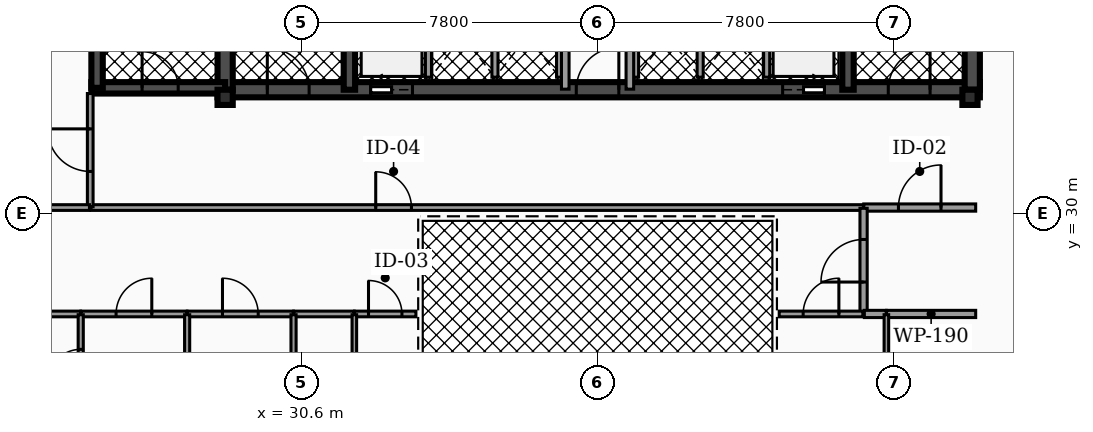
"""IFC4 building model, lengths in metres.
Left out: names, types, materials, properties, quantities, classifications, styles, units other than length and angle.
Written with IfcOpenShell. Run it as: python <this file> out.ifc"""

import sys

from ifc_helpers import new_model, si_unit, direction, frame, frame_2d, origin, origin_2d, place, context, subcontext, project, spatial, rectangle, hollow_rectangle, extrude, element, fill, save


model = new_model("IFC4")
c1 = context("Model", 3, precision=1e-05, world=origin(), true_north=direction((0.0, 1.0)))
c2 = subcontext(c1, "Body", "Model", "MODEL_VIEW")
j1 = project(units=[si_unit("LENGTHUNIT", "METRE"), si_unit("PLANEANGLEUNIT", "RADIAN")], contexts=[c1])
p1 = place(None, origin())
s1 = spatial("IfcSite", under=j1, at=p1, CompositionType="ELEMENT")
p2 = place(p1, origin())
s2 = spatial("IfcBuilding", under=s1, at=p2, CompositionType="ELEMENT")
p3 = place(p2, frame((0.0, 0.0, 9.52)))
s3 = spatial("IfcBuildingStorey", under=s2, at=p3, CompositionType="ELEMENT", Elevation=9.52)
p4 = place(p3, frame((28.4, 33.25, 0.0), z_axis=(0.0, 0.0, 1.0), x_axis=(1.0, 0.0, 0.0)))
e1 = element("IfcWall", 1, at=p4, inside=s3, PredefinedType="SHEAR", context=c2, shape_type="SweptSolid", body=[
    extrude(rectangle(XDim=20.06, YDim=0.4, at=frame_2d((10.03, 0.0))), origin(), (0.0, 0.0, 1.0), 4.14),
])
p5 = place(p4, frame((4.03, 0.0, 0.0)))
e2 = element("IfcOpeningElement", 2, at=p5, cuts=e1, PredefinedType="OPENING", context=c2, shape_type="SweptSolid", body=[
    extrude(rectangle(XDim=1.1, YDim=2.15, at=frame_2d((0.55, 1.075))), frame((0.0, 0.21, 0.0), z_axis=(0.0, -1.0, 0.0), x_axis=(1.0, 0.0, 0.0)), (0.0, 0.0, 1.0), 0.42),
])
p6 = place(p4, frame((14.87, 0.0, 0.0)))
e3 = element("IfcOpeningElement", 3, at=p6, cuts=e1, PredefinedType="OPENING", context=c2, shape_type="SweptSolid", body=[
    extrude(rectangle(XDim=1.1, YDim=2.15, at=frame_2d((0.55, 1.075))), frame((0.0, 0.21, 0.0), z_axis=(0.0, -1.0, 0.0), x_axis=(1.0, 0.0, 0.0)), (0.0, 0.0, 1.0), 0.42),
])
p7 = place(p4, frame((1.31, 0.0, 0.0)))
e4 = element("IfcOpeningElement", 4, at=p7, cuts=e1, PredefinedType="OPENING", context=c2, shape_type="SweptSolid", body=[
    extrude(rectangle(XDim=1.1, YDim=2.2, at=frame_2d((0.55, 1.1))), frame((0.0, 0.21, 0.0), z_axis=(0.0, -1.0, 0.0), x_axis=(1.0, 0.0, 0.0)), (0.0, 0.0, 1.0), 0.42),
])
p8 = place(p4, frame((9.44, 0.0, 0.0)))
e5 = element("IfcOpeningElement", 5, at=p8, cuts=e1, PredefinedType="OPENING", context=c2, shape_type="SweptSolid", body=[
    extrude(rectangle(XDim=1.12, YDim=2.05, at=frame_2d((0.56, 1.025))), frame((0.0, 0.21, 0.0), z_axis=(0.0, -1.0, 0.0), x_axis=(1.0, 0.0, 0.0)), (0.0, 0.0, 1.0), 0.42),
])
p9 = place(p4, frame((17.65, 0.0, 0.0)))
e6 = element("IfcOpeningElement", 6, at=p9, cuts=e1, PredefinedType="OPENING", context=c2, shape_type="SweptSolid", body=[
    extrude(rectangle(XDim=1.1, YDim=2.2, at=frame_2d((0.55, 1.1))), frame((0.0, 0.21, 0.0), z_axis=(0.0, -1.0, 0.0), x_axis=(1.0, 0.0, 0.0)), (0.0, 0.0, 1.0), 0.42),
])
p10 = place(p3, frame((28.6, 33.25, 0.0), z_axis=(0.0, 0.0, 1.0), x_axis=(0.0, 1.0, 0.0)))
e7 = element("IfcWall", 7, at=p10, inside=s3, PredefinedType="SHEAR", context=c2, shape_type="SweptSolid", body=[
    extrude(rectangle(XDim=10.2, YDim=0.4, at=frame_2d((5.1, 0.0))), origin(), (0.0, 0.0, 1.0), 4.14),
])
for number, where, z_axis, x_axis in (
    (8, (31.87, 33.25, 0.0), (0.0, 0.0, 1.0), (0.0, 1.0, 0.0)),
    (9, (44.99, 33.25, 0.0), (0.0, 0.0, 1.0), (0.0, 1.0, 0.0)),
):
    element("IfcWall", number, at=place(p3, frame(where, z_axis=z_axis, x_axis=x_axis)), inside=s3, PredefinedType="SHEAR", context=c2, shape_type="SweptSolid", body=[
        extrude(rectangle(XDim=10.2, YDim=0.3, at=frame_2d((5.1, 0.0))), origin(), (0.0, 0.0, 1.0), 4.14),
    ])
p11 = place(p3, frame((48.26, 33.25, 0.0), z_axis=(0.0, 0.0, 1.0), x_axis=(0.0, 1.0, 0.0)))
e10 = element("IfcWall", 10, at=p11, inside=s3, PredefinedType="SHEAR", context=c2, shape_type="SweptSolid", body=[
    extrude(rectangle(XDim=10.2, YDim=0.4, at=frame_2d((5.1, 0.0))), origin(), (0.0, 0.0, 1.0), 4.14),
])
p12 = place(p3, frame((25.08, 33.3, 0.0), z_axis=(0.0, 0.0, 1.0), x_axis=(1.0, 0.0, 0.0)))
e11 = element("IfcWall", 11, at=p12, inside=s3, PredefinedType="SHEAR", context=c2, shape_type="SweptSolid", body=[
    extrude(rectangle(XDim=3.52, YDim=0.3, at=frame_2d((1.76, 0.0))), origin(), (0.0, 0.0, 1.0), 4.14),
])
p13 = place(p12, frame((1.335, 0.0, 0.0)))
e12 = element("IfcOpeningElement", 12, at=p13, cuts=e11, PredefinedType="OPENING", context=c2, shape_type="SweptSolid", body=[
    extrude(rectangle(XDim=0.95, YDim=2.2, at=frame_2d((0.475, 1.1))), frame((0.0, 0.16, 0.0), z_axis=(0.0, -1.0, 0.0), x_axis=(1.0, 0.0, 0.0)), (0.0, 0.0, 1.0), 0.32),
])
p14 = place(p3, frame((25.23, 33.3, 0.0), z_axis=(0.0, 0.0, 1.0), x_axis=(0.0, 1.0, 0.0)))
e13 = element("IfcWall", 13, at=p14, inside=s3, PredefinedType="SHEAR", context=c2, shape_type="SweptSolid", body=[
    extrude(rectangle(XDim=7.6, YDim=0.3, at=frame_2d((3.8, 0.0))), origin(), (0.0, 0.0, 1.0), 4.14),
])
for number, where, z_axis, x_axis in (
    (14, (28.6, 33.05, 0.0), (0.0, 0.0, 1.0), (1.0, 0.0, 0.0)),
    (15, (48.2, 33.05, 0.0), (0.0, 0.0, 1.0), (1.0, 0.0, 0.0)),
):
    element("IfcColumn", number, at=place(p3, frame(where, z_axis=z_axis, x_axis=x_axis)), inside=s3, PredefinedType="PILASTER", context=c2, shape_type="SweptSolid", body=[
        extrude(hollow_rectangle(XDim=0.4, YDim=0.4, WallThickness=0.02, at=origin_2d()), origin(), (0.0, 0.0, 1.0), 4.14),
    ])
for number, where, z_axis, x_axis in (
    (16, (33.95, 33.58, 0.0), (0.0, 0.0, 1.0), (0.0, 1.0, 0.0)),
    (17, (42.85, 33.58, 0.0), (0.0, 0.0, 1.0), (0.0, 1.0, 0.0)),
):
    element("IfcWall", number, at=place(p3, frame(where, z_axis=z_axis, x_axis=x_axis)), inside=s3, PredefinedType="SOLIDWALL", context=c2, shape_type="SweptSolid", body=[
        extrude(rectangle(XDim=2.45, YDim=0.16, at=frame_2d((1.225, 0.0))), origin(), (0.0, 0.0, 1.0), 3.112),
    ])
for number, where, z_axis, x_axis in (
    (18, (35.7, 33.58, 0.0), (0.0, 0.0, 1.0), (0.0, 1.0, 0.0)),
    (19, (37.4, 33.58, 0.0), (0.0, 0.0, 1.0), (0.0, 1.0, 0.0)),
    (20, (39.4, 33.58, 0.0), (0.0, 0.0, 1.0), (0.0, 1.0, 0.0)),
    (21, (41.1, 33.58, 0.0), (0.0, 0.0, 1.0), (0.0, 1.0, 0.0)),
):
    element("IfcWall", number, at=place(p3, frame(where, z_axis=z_axis, x_axis=x_axis)), inside=s3, PredefinedType="SOLIDWALL", context=c2, shape_type="SweptSolid", body=[
        extrude(rectangle(XDim=2.25, YDim=0.16, at=frame_2d((1.125, 0.0))), origin(), (0.0, 0.0, 1.0), 3.112),
    ])
p15 = place(p3, frame((37.55, 33.265, 0.0), z_axis=(0.0, 0.0, 1.0), x_axis=(0.0, 1.0, 0.0)))
e22 = element("IfcWall", 22, at=p15, inside=s3, PredefinedType="PARTITIONING", context=c2, shape_type="SweptSolid", body=[
    extrude(rectangle(XDim=4.265, YDim=0.2, at=frame_2d((2.133, 0.0))), origin(), (0.0, 0.0, 1.0), 3.097),
])
p16 = place(p15, frame((3.093, 0.0, 0.0)))
e23 = element("IfcOpeningElement", 23, at=p16, cuts=e22, PredefinedType="OPENING", context=c2, shape_type="SweptSolid", body=[
    extrude(rectangle(XDim=0.88, YDim=2.05, at=frame_2d((0.44, 1.025))), frame((0.0, 0.11, 0.0), z_axis=(0.0, -1.0, 0.0), x_axis=(1.0, 0.0, 0.0)), (0.0, 0.0, 1.0), 0.22),
])
p17 = place(p3, frame((39.25, 33.265, 0.0), z_axis=(0.0, 0.0, 1.0), x_axis=(0.0, 1.0, 0.0)))
e24 = element("IfcWall", 24, at=p17, inside=s3, PredefinedType="PARTITIONING", context=c2, shape_type="SweptSolid", body=[
    extrude(rectangle(XDim=4.265, YDim=0.2, at=frame_2d((2.133, 0.0))), origin(), (0.0, 0.0, 1.0), 3.097),
])
p18 = place(p17, frame((3.093, 0.0, 0.0)))
e25 = element("IfcOpeningElement", 25, at=p18, cuts=e24, PredefinedType="OPENING", context=c2, shape_type="SweptSolid", body=[
    extrude(rectangle(XDim=0.88, YDim=2.05, at=frame_2d((0.44, 1.025))), frame((0.0, 0.11, 0.0), z_axis=(0.0, -1.0, 0.0), x_axis=(1.0, 0.0, 0.0)), (0.0, 0.0, 1.0), 0.22),
])
p19 = place(p3, frame((45.405, 30.15, 0.0), z_axis=(0.0, 0.0, 1.0), x_axis=(1.0, 0.0, 0.0)))
e26 = element("IfcWall", 26, at=p19, inside=s3, PredefinedType="PARTITIONING", context=c2, shape_type="SweptSolid", body=[
    extrude(rectangle(XDim=2.945, YDim=0.19, at=frame_2d((1.473, 0.0))), origin(), (0.0, 0.0, 1.0), 3.097),
])
p20 = place(p19, frame((0.913, 0.0, 0.0)))
e27 = element("IfcOpeningElement", 27, at=p20, cuts=e26, PredefinedType="OPENING", context=c2, shape_type="SweptSolid", body=[
    extrude(rectangle(XDim=1.12, YDim=2.05, at=frame_2d((0.56, 1.025))), frame((0.0, 0.105, 0.0), z_axis=(0.0, -1.0, 0.0), x_axis=(1.0, 0.0, 0.0)), (0.0, 0.0, 1.0), 0.21),
])
p21 = place(p3, frame((25.07, 30.15, 0.0), z_axis=(0.0, 0.0, 1.0), x_axis=(1.0, 0.0, 0.0)))
e28 = element("IfcWall", 28, at=p21, inside=s3, PredefinedType="PARTITIONING", context=c2, shape_type="SweptSolid", body=[
    extrude(rectangle(XDim=20.325, YDim=0.15, at=frame_2d((10.163, 0.0))), origin(), (0.0, 0.0, 1.0), 3.097),
])
p22 = place(p21, frame((7.492, 0.0, 0.0)))
e29 = element("IfcOpeningElement", 29, at=p22, cuts=e28, PredefinedType="OPENING", context=c2, shape_type="SweptSolid", body=[
    extrude(rectangle(XDim=0.94, YDim=2.05, at=frame_2d((0.47, 1.025))), frame((0.0, 0.085, 0.0), z_axis=(0.0, -1.0, 0.0), x_axis=(1.0, 0.0, 0.0)), (0.0, 0.0, 1.0), 0.17),
])
p23 = place(p3, frame((25.05, 30.17, 0.0), z_axis=(0.0, 0.0, 1.0), x_axis=(0.0, 1.0, 0.0)))
e30 = element("IfcWall", 30, at=p23, inside=s3, PredefinedType="PARTITIONING", context=c2, shape_type="SweptSolid", body=[
    extrude(rectangle(XDim=2.98, YDim=0.15, at=frame_2d((1.49, 0.0))), origin(), (0.0, 0.0, 1.0), 3.097),
])
p24 = place(p23, frame((0.93, 0.0, 0.0)))
e31 = element("IfcOpeningElement", 31, at=p24, cuts=e30, PredefinedType="OPENING", context=c2, shape_type="SweptSolid", body=[
    extrude(rectangle(XDim=1.12, YDim=2.05, at=frame_2d((0.56, 1.025))), frame((0.0, 0.085, 0.0), z_axis=(0.0, -1.0, 0.0), x_axis=(1.0, 0.0, 0.0)), (0.0, 0.0, 1.0), 0.17),
])
p25 = place(p3, frame((45.4, 27.37, 0.0), z_axis=(0.0, 0.0, 1.0), x_axis=(0.0, 1.0, 0.0)))
e32 = element("IfcWall", 32, at=p25, inside=s3, PredefinedType="PARTITIONING", context=c2, shape_type="SweptSolid", body=[
    extrude(rectangle(XDim=2.76, YDim=0.19, at=frame_2d((1.38, 0.0))), origin(), (0.0, 0.0, 1.0), 3.097),
])
p26 = place(p25, frame((0.82, 0.0, 0.0)))
e33 = element("IfcOpeningElement", 33, at=p26, cuts=e32, PredefinedType="OPENING", context=c2, shape_type="SweptSolid", body=[
    extrude(rectangle(XDim=1.12, YDim=2.05, at=frame_2d((0.56, 1.025))), frame((0.0, 0.105, 0.0), z_axis=(0.0, -1.0, 0.0), x_axis=(1.0, 0.0, 0.0)), (0.0, 0.0, 1.0), 0.21),
])
p27 = place(p3, frame((46.005, 27.35, 0.0), z_axis=(0.0, 0.0, 1.0), x_axis=(1.0, 0.0, 0.0)))
e34 = element("IfcWall", 34, at=p27, inside=s3, PredefinedType="PARTITIONING", context=c2, shape_type="SweptSolid", body=[
    extrude(rectangle(XDim=2.345, YDim=0.19, at=frame_2d((1.173, 0.0))), origin(), (0.0, 0.0, 1.0), 3.097),
])
p28 = place(p3, frame((45.42, 27.35, 0.0), z_axis=(0.0, 0.0, 1.0), x_axis=(1.0, 0.0, 0.0)))
e35 = element("IfcWall", 35, at=p28, inside=s3, PredefinedType="PARTITIONING", context=c2, shape_type="SweptSolid", body=[
    extrude(rectangle(XDim=0.575, YDim=0.19, at=frame_2d((0.288, 0.0))), origin(), (0.0, 0.0, 1.0), 3.097),
])
p29 = place(p3, frame((22.8, 27.35, 0.0), z_axis=(0.0, 0.0, 1.0), x_axis=(1.0, 0.0, 0.0)))
e36 = element("IfcWall", 36, at=p29, inside=s3, PredefinedType="PARTITIONING", context=c2, shape_type="SweptSolid", body=[
    extrude(rectangle(XDim=1.995, YDim=0.15, at=frame_2d((0.998, 0.0))), origin(), (0.0, 0.0, 1.0), 3.097),
])
p30 = place(p3, frame((24.805, 27.35, 0.0), z_axis=(0.0, 0.0, 1.0), x_axis=(1.0, 0.0, 0.0)))
e37 = element("IfcWall", 37, at=p30, inside=s3, PredefinedType="PARTITIONING", context=c2, shape_type="SweptSolid", body=[
    extrude(rectangle(XDim=2.79, YDim=0.15, at=frame_2d((1.395, 0.0))), origin(), (0.0, 0.0, 1.0), 3.097),
])
p31 = place(p30, frame((0.925, 0.0, 0.0)))
e38 = element("IfcOpeningElement", 38, at=p31, cuts=e37, PredefinedType="OPENING", context=c2, shape_type="SweptSolid", body=[
    extrude(rectangle(XDim=0.94, YDim=2.05, at=frame_2d((0.47, 1.025))), frame((0.0, 0.085, 0.0), z_axis=(0.0, -1.0, 0.0), x_axis=(1.0, 0.0, 0.0)), (0.0, 0.0, 1.0), 0.17),
])
p32 = place(p3, frame((27.605, 27.35, 0.0), z_axis=(0.0, 0.0, 1.0), x_axis=(1.0, 0.0, 0.0)))
e39 = element("IfcWall", 39, at=p32, inside=s3, PredefinedType="PARTITIONING", context=c2, shape_type="SweptSolid", body=[
    extrude(rectangle(XDim=2.79, YDim=0.15, at=frame_2d((1.395, 0.0))), origin(), (0.0, 0.0, 1.0), 3.097),
])
p33 = place(p32, frame((0.925, 0.0, 0.0)))
e40 = element("IfcOpeningElement", 40, at=p33, cuts=e39, PredefinedType="OPENING", context=c2, shape_type="SweptSolid", body=[
    extrude(rectangle(XDim=0.94, YDim=2.05, at=frame_2d((0.47, 1.025))), frame((0.0, 0.085, 0.0), z_axis=(0.0, -1.0, 0.0), x_axis=(1.0, 0.0, 0.0)), (0.0, 0.0, 1.0), 0.17),
])
p34 = place(p3, frame((30.405, 27.35, 0.0), z_axis=(0.0, 0.0, 1.0), x_axis=(1.0, 0.0, 0.0)))
e41 = element("IfcWall", 41, at=p34, inside=s3, PredefinedType="PARTITIONING", context=c2, shape_type="SweptSolid", body=[
    extrude(rectangle(XDim=1.59, YDim=0.15, at=frame_2d((0.795, 0.0))), origin(), (0.0, 0.0, 1.0), 3.097),
])
p35 = place(p3, frame((32.005, 27.35, 0.0), z_axis=(0.0, 0.0, 1.0), x_axis=(1.0, 0.0, 0.0)))
e42 = element("IfcWall", 42, at=p35, inside=s3, PredefinedType="PARTITIONING", context=c2, shape_type="SweptSolid", body=[
    extrude(rectangle(XDim=1.615, YDim=0.15, at=frame_2d((0.808, 0.0))), origin(), (0.0, 0.0, 1.0), 3.097),
])
p36 = place(p35, frame((0.367, 0.0, 0.0)))
e43 = element("IfcOpeningElement", 43, at=p36, cuts=e42, PredefinedType="OPENING", context=c2, shape_type="SweptSolid", body=[
    extrude(rectangle(XDim=0.88, YDim=2.05, at=frame_2d((0.44, 1.025))), frame((0.0, 0.085, 0.0), z_axis=(0.0, -1.0, 0.0), x_axis=(1.0, 0.0, 0.0)), (0.0, 0.0, 1.0), 0.17),
])
p37 = place(p3, frame((43.18, 27.35, 0.0), z_axis=(0.0, 0.0, 1.0), x_axis=(1.0, 0.0, 0.0)))
e44 = element("IfcWall", 44, at=p37, inside=s3, PredefinedType="PARTITIONING", context=c2, shape_type="SweptSolid", body=[
    extrude(rectangle(XDim=2.2, YDim=0.15, at=frame_2d((1.1, 0.0))), origin(), (0.0, 0.0, 1.0), 3.097),
])
p38 = place(p37, frame((0.63, 0.0, 0.0)))
e45 = element("IfcOpeningElement", 45, at=p38, cuts=e44, PredefinedType="OPENING", context=c2, shape_type="SweptSolid", body=[
    extrude(rectangle(XDim=0.94, YDim=2.05, at=frame_2d((0.47, 1.025))), frame((0.0, 0.085, 0.0), z_axis=(0.0, -1.0, 0.0), x_axis=(1.0, 0.0, 0.0)), (0.0, 0.0, 1.0), 0.17),
])
p39 = place(p3, frame((22.8, 30.15, 0.0), z_axis=(0.0, 0.0, 1.0), x_axis=(1.0, 0.0, 0.0)))
e46 = element("IfcWall", 46, at=p39, inside=s3, PredefinedType="PARTITIONING", context=c2, shape_type="SweptSolid", body=[
    extrude(rectangle(XDim=2.23, YDim=0.15, at=frame_2d((1.115, 0.0))), origin(), (0.0, 0.0, 1.0), 3.097),
])
p40 = place(p3, frame((24.8, 23.848, 0.0), z_axis=(0.0, 0.0, 1.0), x_axis=(0.0, 1.0, 0.0)))
e47 = element("IfcWall", 47, at=p40, inside=s3, PredefinedType="PARTITIONING", context=c2, shape_type="SweptSolid", body=[
    extrude(rectangle(XDim=3.482, YDim=0.135, at=frame_2d((1.741, 0.0))), origin(), (0.0, 0.0, 1.0), 3.097),
])
p41 = place(p40, frame((1.711, 0.0, 0.0)))
e48 = element("IfcOpeningElement", 48, at=p41, cuts=e47, PredefinedType="OPENING", context=c2, shape_type="SweptSolid", body=[
    extrude(rectangle(XDim=0.86, YDim=2.05, at=frame_2d((0.43, 1.025))), frame((0.0, 0.077, 0.0), z_axis=(0.0, -1.0, 0.0), x_axis=(1.0, 0.0, 0.0)), (0.0, 0.0, 1.0), 0.155),
])
for number, where, z_axis, x_axis in (
    (49, (27.6, 23.82, 0.0), (0.0, 0.0, 1.0), (0.0, 1.0, 0.0)),
    (50, (30.4, 23.82, 0.0), (0.0, 0.0, 1.0), (0.0, 1.0, 0.0)),
):
    element("IfcWall", number, at=place(p3, frame(where, z_axis=z_axis, x_axis=x_axis)), inside=s3, PredefinedType="PARTITIONING", context=c2, shape_type="SweptSolid", body=[
        extrude(rectangle(XDim=3.51, YDim=0.135, at=frame_2d((1.755, 0.0))), origin(), (0.0, 0.0, 1.0), 3.097),
    ])
for number, where, z_axis, x_axis in (
    (51, (46.0, 18.02, 0.0), (0.0, 0.0, 1.0), (0.0, 1.0, 0.0)),
    (52, (32.0, 18.02, 0.0), (0.0, 0.0, 1.0), (0.0, 1.0, 0.0)),
):
    element("IfcWall", number, at=place(p3, frame(where, z_axis=z_axis, x_axis=x_axis)), inside=s3, PredefinedType="PARTITIONING", context=c2, shape_type="SweptSolid", body=[
        extrude(rectangle(XDim=9.31, YDim=0.12, at=frame_2d((4.655, 0.0))), origin(), (0.0, 0.0, 1.0), 3.097),
    ])
p42 = place(p5, origin())
e53 = element("IfcDoor", 53, at=p42, inside=s3, OperationType="SLIDING_TO_LEFT", PredefinedType="DOOR", context=c2, shape_type="SweptSolid", body=[
    extrude(rectangle(XDim=1.1, YDim=2.15, at=frame_2d((0.55, 1.075))), frame((0.0, 0.025, 0.0), z_axis=(0.0, -1.0, 0.0), x_axis=(1.0, 0.0, 0.0)), (0.0, 0.0, 1.0), 0.05),
])
fill(e2, e53)
p43 = place(p6, origin())
e54 = element("IfcDoor", 54, at=p43, inside=s3, OperationType="SLIDING_TO_RIGHT", PredefinedType="DOOR", context=c2, shape_type="SweptSolid", body=[
    extrude(rectangle(XDim=1.1, YDim=2.15, at=frame_2d((0.55, 1.075))), frame((0.0, 0.025, 0.0), z_axis=(0.0, -1.0, 0.0), x_axis=(1.0, 0.0, 0.0)), (0.0, 0.0, 1.0), 0.05),
])
fill(e3, e54)
p44 = place(p7, origin())
e55 = element("IfcDoor", 55, at=p44, inside=s3, OperationType="SINGLE_SWING_LEFT", PredefinedType="DOOR", context=c2, shape_type="SweptSolid", body=[
    extrude(rectangle(XDim=1.1, YDim=2.2, at=frame_2d((0.55, 1.1))), frame((0.0, 0.025, 0.0), z_axis=(0.0, -1.0, 0.0), x_axis=(1.0, 0.0, 0.0)), (0.0, 0.0, 1.0), 0.05),
])
fill(e4, e55)
p45 = place(p8, origin())
e56 = element("IfcDoor", 56, at=p45, inside=s3, OperationType="SINGLE_SWING_RIGHT", PredefinedType="DOOR", context=c2, shape_type="SweptSolid", body=[
    extrude(rectangle(XDim=1.12, YDim=2.05, at=frame_2d((0.56, 1.025))), frame((0.0, 0.025, 0.0), z_axis=(0.0, -1.0, 0.0), x_axis=(1.0, 0.0, 0.0)), (0.0, 0.0, 1.0), 0.05),
])
fill(e5, e56)
p46 = place(p9, origin())
e57 = element("IfcDoor", 57, at=p46, inside=s3, OperationType="SINGLE_SWING_RIGHT", PredefinedType="DOOR", context=c2, shape_type="SweptSolid", body=[
    extrude(rectangle(XDim=1.1, YDim=2.2, at=frame_2d((0.55, 1.1))), frame((0.0, 0.025, 0.0), z_axis=(0.0, -1.0, 0.0), x_axis=(1.0, 0.0, 0.0)), (0.0, 0.0, 1.0), 0.05),
])
fill(e6, e57)
p47 = place(p13, origin())
e58 = element("IfcDoor", 58, at=p47, inside=s3, OperationType="SINGLE_SWING_LEFT", PredefinedType="DOOR", context=c2, shape_type="SweptSolid", body=[
    extrude(rectangle(XDim=0.95, YDim=2.2, at=frame_2d((0.475, 1.1))), frame((0.0, 0.025, 0.0), z_axis=(0.0, -1.0, 0.0), x_axis=(1.0, 0.0, 0.0)), (0.0, 0.0, 1.0), 0.05),
])
fill(e12, e58)
p48 = place(p20, origin())
e59 = element("IfcDoor", 59, at=p48, inside=s3, OperationType="SINGLE_SWING_RIGHT", PredefinedType="DOOR", context=c2, shape_type="SweptSolid", body=[
    extrude(rectangle(XDim=1.12, YDim=2.05, at=frame_2d((0.56, 1.025))), frame((0.0, 0.025, 0.0), z_axis=(0.0, -1.0, 0.0), x_axis=(1.0, 0.0, 0.0)), (0.0, 0.0, 1.0), 0.05),
])
fill(e27, e59)
p49 = place(p22, origin())
e60 = element("IfcDoor", 60, at=p49, inside=s3, OperationType="SINGLE_SWING_LEFT", PredefinedType="DOOR", context=c2, shape_type="SweptSolid", body=[
    extrude(rectangle(XDim=0.94, YDim=2.05, at=frame_2d((0.47, 1.025))), frame((0.0, 0.025, 0.0), z_axis=(0.0, -1.0, 0.0), x_axis=(1.0, 0.0, 0.0)), (0.0, 0.0, 1.0), 0.05),
])
fill(e29, e60)
p50 = place(p24, origin())
e61 = element("IfcDoor", 61, at=p50, inside=s3, OperationType="SINGLE_SWING_RIGHT", PredefinedType="DOOR", context=c2, shape_type="SweptSolid", body=[
    extrude(rectangle(XDim=1.12, YDim=2.05, at=frame_2d((0.56, 1.025))), frame((0.0, 0.025, 0.0), z_axis=(0.0, -1.0, 0.0), x_axis=(1.0, 0.0, 0.0)), (0.0, 0.0, 1.0), 0.05),
])
fill(e31, e61)
p51 = place(p26, origin())
e62 = element("IfcDoor", 62, at=p51, inside=s3, OperationType="SINGLE_SWING_LEFT", PredefinedType="DOOR", context=c2, shape_type="SweptSolid", body=[
    extrude(rectangle(XDim=1.12, YDim=2.05, at=frame_2d((0.56, 1.025))), frame((0.0, 0.025, 0.0), z_axis=(0.0, -1.0, 0.0), x_axis=(1.0, 0.0, 0.0)), (0.0, 0.0, 1.0), 0.05),
])
fill(e33, e62)
p52 = place(p31, origin())
e63 = element("IfcDoor", 63, at=p52, inside=s3, OperationType="SINGLE_SWING_RIGHT", PredefinedType="DOOR", context=c2, shape_type="SweptSolid", body=[
    extrude(rectangle(XDim=0.94, YDim=2.05, at=frame_2d((0.47, 1.025))), frame((0.0, 0.025, 0.0), z_axis=(0.0, -1.0, 0.0), x_axis=(1.0, 0.0, 0.0)), (0.0, 0.0, 1.0), 0.05),
])
fill(e38, e63)
p53 = place(p33, origin())
e64 = element("IfcDoor", 64, at=p53, inside=s3, OperationType="SINGLE_SWING_LEFT", PredefinedType="DOOR", context=c2, shape_type="SweptSolid", body=[
    extrude(rectangle(XDim=0.94, YDim=2.05, at=frame_2d((0.47, 1.025))), frame((0.0, 0.025, 0.0), z_axis=(0.0, -1.0, 0.0), x_axis=(1.0, 0.0, 0.0)), (0.0, 0.0, 1.0), 0.05),
])
fill(e40, e64)
p54 = place(p36, origin())
e65 = element("IfcDoor", 65, at=p54, inside=s3, OperationType="SINGLE_SWING_LEFT", PredefinedType="DOOR", context=c2, shape_type="SweptSolid", body=[
    extrude(rectangle(XDim=0.88, YDim=2.05, at=frame_2d((0.44, 1.025))), frame((0.0, 0.025, 0.0), z_axis=(0.0, -1.0, 0.0), x_axis=(1.0, 0.0, 0.0)), (0.0, 0.0, 1.0), 0.05),
])
fill(e43, e65)
p55 = place(p38, origin())
e66 = element("IfcDoor", 66, at=p55, inside=s3, OperationType="SINGLE_SWING_RIGHT", PredefinedType="DOOR", context=c2, shape_type="SweptSolid", body=[
    extrude(rectangle(XDim=0.94, YDim=2.05, at=frame_2d((0.47, 1.025))), frame((0.0, 0.025, 0.0), z_axis=(0.0, -1.0, 0.0), x_axis=(1.0, 0.0, 0.0)), (0.0, 0.0, 1.0), 0.05),
])
fill(e45, e66)
p56 = place(p41, origin())
e67 = element("IfcDoor", 67, at=p56, inside=s3, OperationType="SINGLE_SWING_LEFT", PredefinedType="DOOR", context=c2, shape_type="SweptSolid", body=[
    extrude(rectangle(XDim=0.86, YDim=2.05, at=frame_2d((0.43, 1.025))), frame((0.0, 0.025, 0.0), z_axis=(0.0, -1.0, 0.0), x_axis=(1.0, 0.0, 0.0)), (0.0, 0.0, 1.0), 0.05),
])
fill(e48, e67)
save(model, sys.argv[1])
